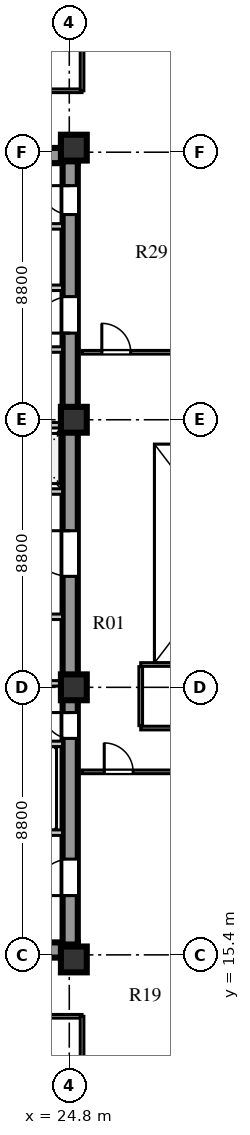
"""IFC4 building model, lengths in metres.
Left out: names, types, materials, properties, quantities, classifications, styles, units other than length and angle.
Written with IfcOpenShell. Run it as: python <this file> out.ifc"""

import sys

from ifc_helpers import new_model, si_unit, direction, frame, frame_2d, origin, origin_2d, place, context, subcontext, project, spatial, rectangle, extrude, element, fill, save


model = new_model("IFC4")
c1 = context("Model", 3, precision=1e-05, world=origin(), true_north=direction((0.0, 1.0)))
c2 = subcontext(c1, "Body", "Model", "MODEL_VIEW")
j1 = project(units=[si_unit("LENGTHUNIT", "METRE"), si_unit("PLANEANGLEUNIT", "RADIAN")], contexts=[c1])
p1 = place(None, origin())
s1 = spatial("IfcSite", under=j1, at=p1, CompositionType="ELEMENT")
p2 = place(p1, origin())
s2 = spatial("IfcBuilding", under=s1, at=p2, CompositionType="ELEMENT")
p3 = place(p2, frame((0.0, 0.0, 173.3)))
s3 = spatial("IfcBuildingStorey", under=s2, at=p3, CompositionType="ELEMENT", Elevation=173.3)
for number, where, z_axis, x_axis in (
    (1, (15.4, 15.56, 0.0), (0.0, 0.0, 1.0), (1.0, 0.0, 0.0)),
    (2, (15.4, 41.69, 0.0), (0.0, 0.0, 1.0), (1.0, 0.0, 0.0)),
):
    element("IfcWall", number, at=place(p3, frame(where, z_axis=z_axis, x_axis=x_axis)), inside=s3, PredefinedType="SHEAR", context=c2, shape_type="SweptSolid", body=[
        extrude(rectangle(XDim=9.68, YDim=0.5, at=frame_2d((4.84, 0.0))), origin(), (0.0, 0.0, 1.0), 3.6),
    ])
p4 = place(p3, frame((24.83, 15.74, 0.0), z_axis=(0.0, 0.0, 1.0), x_axis=(0.0, 1.0, 0.0)))
e3 = element("IfcWall", 3, at=p4, inside=s3, PredefinedType="SHEAR", context=c2, shape_type="SweptSolid", body=[
    extrude(rectangle(XDim=25.76, YDim=0.5, at=frame_2d((12.88, 0.0))), origin(), (0.0, 0.0, 1.0), 3.6),
])
p5 = place(p4, frame((1.61, 0.0, 0.0)))
e4 = element("IfcOpeningElement", 4, at=p5, cuts=e3, PredefinedType="OPENING", context=c2, shape_type="SweptSolid", body=[
    extrude(rectangle(XDim=1.2, YDim=2.1, at=frame_2d((0.6, 1.05))), frame((0.0, 0.26, 0.0), z_axis=(0.0, -1.0, 0.0), x_axis=(1.0, 0.0, 0.0)), (0.0, 0.0, 1.0), 0.52),
])
p6 = place(p4, frame((6.78, 0.0, 0.0)))
e5 = element("IfcOpeningElement", 5, at=p6, cuts=e3, PredefinedType="OPENING", context=c2, shape_type="SweptSolid", body=[
    extrude(rectangle(XDim=0.85, YDim=2.06, at=frame_2d((0.425, 1.03))), frame((0.0, 0.26, 0.0), z_axis=(0.0, -1.0, 0.0), x_axis=(1.0, 0.0, 0.0)), (0.0, 0.0, 1.0), 0.52),
])
p7 = place(p4, frame((12.11, 0.0, 0.0)))
e6 = element("IfcOpeningElement", 6, at=p7, cuts=e3, PredefinedType="OPENING", context=c2, shape_type="SweptSolid", body=[
    extrude(rectangle(XDim=1.5, YDim=2.12, at=frame_2d((0.75, 1.06))), frame((0.0, 0.26, 0.0), z_axis=(0.0, -1.0, 0.0), x_axis=(1.0, 0.0, 0.0)), (0.0, 0.0, 1.0), 0.52),
])
p8 = place(p4, frame((20.11, 0.0, 0.0)))
e7 = element("IfcOpeningElement", 7, at=p8, cuts=e3, PredefinedType="OPENING", context=c2, shape_type="SweptSolid", body=[
    extrude(rectangle(XDim=1.2, YDim=2.12, at=frame_2d((0.6, 1.06))), frame((0.0, 0.26, 0.0), z_axis=(0.0, -1.0, 0.0), x_axis=(1.0, 0.0, 0.0)), (0.0, 0.0, 1.0), 0.52),
])
p9 = place(p4, frame((24.01, 0.0, 0.0)))
e8 = element("IfcOpeningElement", 8, at=p9, cuts=e3, PredefinedType="OPENING", context=c2, shape_type="SweptSolid", body=[
    extrude(rectangle(XDim=0.95, YDim=2.1, at=frame_2d((0.475, 1.05))), frame((0.0, 0.26, 0.0), z_axis=(0.0, -1.0, 0.0), x_axis=(1.0, 0.0, 0.0)), (0.0, 0.0, 1.0), 0.52),
])
for number, where, z_axis, x_axis in (
    (9, (24.95, 15.25, 0.0), (0.0, 0.0, 1.0), (1.0, 0.0, 0.0)),
    (10, (24.95, 24.2, 0.0), (0.0, 0.0, 1.0), (1.0, 0.0, 0.0)),
    (11, (24.95, 33.0, 0.0), (0.0, 0.0, 1.0), (1.0, 0.0, 0.0)),
    (12, (24.95, 41.95, 0.0), (0.0, 0.0, 1.0), (1.0, 0.0, 0.0)),
):
    element("IfcColumn", number, at=place(p3, frame(where, z_axis=z_axis, x_axis=x_axis)), inside=s3, PredefinedType="COLUMN", context=c2, shape_type="SweptSolid", body=[
        extrude(rectangle(XDim=0.85, YDim=0.85, at=origin_2d()), origin(), (0.0, 0.0, 1.0), 3.6),
    ])
p10 = place(p3, frame((19.64, 19.42, 0.0), z_axis=(0.0, 0.0, 1.0), x_axis=(1.0, 0.0, 0.0)))
e13 = element("IfcWall", 13, at=p10, inside=s3, PredefinedType="SOLIDWALL", context=c2, shape_type="SweptSolid", body=[
    extrude(rectangle(XDim=4.94, YDim=0.18, at=frame_2d((2.47, 0.0))), origin(), (0.0, 0.0, 1.0), 3.6),
])
p11 = place(p10, frame((0.72, 0.0, 0.0)))
e14 = element("IfcOpeningElement", 14, at=p11, cuts=e13, PredefinedType="OPENING", context=c2, shape_type="SweptSolid", body=[
    extrude(rectangle(XDim=1.1, YDim=2.1, at=frame_2d((0.55, 1.05))), frame((0.0, 0.1, 0.0), z_axis=(0.0, -1.0, 0.0), x_axis=(1.0, 0.0, 0.0)), (0.0, 0.0, 1.0), 0.2),
])
p12 = place(p10, frame((3.02, 0.0, 0.0)))
e15 = element("IfcOpeningElement", 15, at=p12, cuts=e13, PredefinedType="OPENING", context=c2, shape_type="SweptSolid", body=[
    extrude(rectangle(XDim=1.1, YDim=2.1, at=frame_2d((0.55, 1.05))), frame((0.0, 0.1, 0.0), z_axis=(0.0, -1.0, 0.0), x_axis=(1.0, 0.0, 0.0)), (0.0, 0.0, 1.0), 0.2),
])
p13 = place(p3, frame((19.64, 22.34, 0.0), z_axis=(0.0, 0.0, 1.0), x_axis=(1.0, 0.0, 0.0)))
e16 = element("IfcWall", 16, at=p13, inside=s3, PredefinedType="SOLIDWALL", context=c2, shape_type="SweptSolid", body=[
    extrude(rectangle(XDim=4.94, YDim=0.18, at=frame_2d((2.47, 0.0))), origin(), (0.0, 0.0, 1.0), 3.6),
])
p14 = place(p3, frame((15.9, 26.52, 0.0), z_axis=(0.0, 0.0, 1.0), x_axis=(1.0, 0.0, 0.0)))
e17 = element("IfcWall", 17, at=p14, inside=s3, PredefinedType="SOLIDWALL", context=c2, shape_type="SweptSolid", body=[
    extrude(rectangle(XDim=8.68, YDim=0.18, at=frame_2d((4.34, 0.0))), origin(), (0.0, 0.0, 1.0), 3.6),
])
p15 = place(p14, frame((3.3, 0.0, 0.0)))
e18 = element("IfcOpeningElement", 18, at=p15, cuts=e17, PredefinedType="OPENING", context=c2, shape_type="SweptSolid", body=[
    extrude(rectangle(XDim=0.95, YDim=2.1, at=frame_2d((0.475, 1.05))), frame((0.0, 0.1, 0.0), z_axis=(0.0, -1.0, 0.0), x_axis=(1.0, 0.0, 0.0)), (0.0, 0.0, 1.0), 0.2),
])
p16 = place(p3, frame((15.9, 24.33, 0.0), z_axis=(0.0, 0.0, 1.0), x_axis=(1.0, 0.0, 0.0)))
e19 = element("IfcWall", 19, at=p16, inside=s3, PredefinedType="SOLIDWALL", context=c2, shape_type="SweptSolid", body=[
    extrude(rectangle(XDim=8.68, YDim=0.18, at=frame_2d((4.34, 0.0))), origin(), (0.0, 0.0, 1.0), 2.95),
])
p17 = place(p3, frame((15.9, 30.64, 0.0), z_axis=(0.0, 0.0, 1.0), x_axis=(1.0, 0.0, 0.0)))
e20 = element("IfcWall", 20, at=p17, inside=s3, PredefinedType="SOLIDWALL", context=c2, shape_type="SweptSolid", body=[
    extrude(rectangle(XDim=8.68, YDim=0.18, at=frame_2d((4.34, 0.0))), origin(), (0.0, 0.0, 1.0), 3.6),
])
p18 = place(p17, frame((1.76, 0.0, 0.0)))
e21 = element("IfcOpeningElement", 21, at=p18, cuts=e20, PredefinedType="OPENING", context=c2, shape_type="SweptSolid", body=[
    extrude(rectangle(XDim=1.0, YDim=2.1, at=frame_2d((0.5, 1.05))), frame((0.0, 0.1, 0.0), z_axis=(0.0, -1.0, 0.0), x_axis=(1.0, 0.0, 0.0)), (0.0, 0.0, 1.0), 0.2),
])
p19 = place(p17, frame((3.6, 0.0, 0.0)))
e22 = element("IfcOpeningElement", 22, at=p19, cuts=e20, PredefinedType="OPENING", context=c2, shape_type="SweptSolid", body=[
    extrude(rectangle(XDim=1.0, YDim=2.1, at=frame_2d((0.5, 1.05))), frame((0.0, 0.1, 0.0), z_axis=(0.0, -1.0, 0.0), x_axis=(1.0, 0.0, 0.0)), (0.0, 0.0, 1.0), 0.2),
])
p20 = place(p17, frame((5.44, 0.0, 0.0)))
e23 = element("IfcOpeningElement", 23, at=p20, cuts=e20, PredefinedType="OPENING", context=c2, shape_type="SweptSolid", body=[
    extrude(rectangle(XDim=1.0, YDim=2.1, at=frame_2d((0.5, 1.05))), frame((0.0, 0.1, 0.0), z_axis=(0.0, -1.0, 0.0), x_axis=(1.0, 0.0, 0.0)), (0.0, 0.0, 1.0), 0.2),
])
p21 = place(p17, frame((7.28, 0.0, 0.0)))
e24 = element("IfcOpeningElement", 24, at=p21, cuts=e20, PredefinedType="OPENING", context=c2, shape_type="SweptSolid", body=[
    extrude(rectangle(XDim=1.0, YDim=2.1, at=frame_2d((0.5, 1.05))), frame((0.0, 0.1, 0.0), z_axis=(0.0, -1.0, 0.0), x_axis=(1.0, 0.0, 0.0)), (0.0, 0.0, 1.0), 0.2),
])
p22 = place(p3, frame((15.9, 32.82, 0.0), z_axis=(0.0, 0.0, 1.0), x_axis=(1.0, 0.0, 0.0)))
e25 = element("IfcWall", 25, at=p22, inside=s3, PredefinedType="SOLIDWALL", context=c2, shape_type="SweptSolid", body=[
    extrude(rectangle(XDim=8.68, YDim=0.18, at=frame_2d((4.34, 0.0))), origin(), (0.0, 0.0, 1.0), 2.95),
])
p23 = place(p3, frame((22.02, 35.31, 0.0), z_axis=(0.0, 0.0, 1.0), x_axis=(1.0, 0.0, 0.0)))
e26 = element("IfcWall", 26, at=p23, inside=s3, PredefinedType="SOLIDWALL", context=c2, shape_type="SweptSolid", body=[
    extrude(rectangle(XDim=2.56, YDim=0.18, at=frame_2d((1.28, 0.0))), origin(), (0.0, 0.0, 1.0), 3.6),
])
p24 = place(p23, frame((0.55, 0.0, 0.0)))
e27 = element("IfcOpeningElement", 27, at=p24, cuts=e26, PredefinedType="OPENING", context=c2, shape_type="SweptSolid", body=[
    extrude(rectangle(XDim=1.0, YDim=2.1, at=frame_2d((0.5, 1.05))), frame((0.0, 0.1, 0.0), z_axis=(0.0, -1.0, 0.0), x_axis=(1.0, 0.0, 0.0)), (0.0, 0.0, 1.0), 0.2),
])
p25 = place(p3, frame((19.64, 37.34, 0.0), z_axis=(0.0, 0.0, 1.0), x_axis=(1.0, 0.0, 0.0)))
e28 = element("IfcWall", 28, at=p25, inside=s3, PredefinedType="SOLIDWALL", context=c2, shape_type="SweptSolid", body=[
    extrude(rectangle(XDim=4.94, YDim=0.18, at=frame_2d((2.47, 0.0))), origin(), (0.0, 0.0, 1.0), 3.6),
])
p26 = place(p25, frame((0.45, 0.0, 0.0)))
e29 = element("IfcOpeningElement", 29, at=p26, cuts=e28, PredefinedType="OPENING", context=c2, shape_type="SweptSolid", body=[
    extrude(rectangle(XDim=1.0, YDim=2.1, at=frame_2d((0.5, 1.05))), frame((0.0, 0.1, 0.0), z_axis=(0.0, -1.0, 0.0), x_axis=(1.0, 0.0, 0.0)), (0.0, 0.0, 1.0), 0.2),
])
p27 = place(p25, frame((2.5, 0.0, 0.0)))
e30 = element("IfcOpeningElement", 30, at=p27, cuts=e28, PredefinedType="OPENING", context=c2, shape_type="SweptSolid", body=[
    extrude(rectangle(XDim=1.0, YDim=2.1, at=frame_2d((0.5, 1.05))), frame((0.0, 0.1, 0.0), z_axis=(0.0, -1.0, 0.0), x_axis=(1.0, 0.0, 0.0)), (0.0, 0.0, 1.0), 0.2),
])
p28 = place(p3, frame((19.64, 39.36, 0.0), z_axis=(0.0, 0.0, 1.0), x_axis=(1.0, 0.0, 0.0)))
e31 = element("IfcWall", 31, at=p28, inside=s3, PredefinedType="SOLIDWALL", context=c2, shape_type="SweptSolid", body=[
    extrude(rectangle(XDim=4.94, YDim=0.18, at=frame_2d((2.47, 0.0))), origin(), (0.0, 0.0, 1.0), 3.6),
])
p29 = place(p3, frame((25.22, 21.42, 0.0), z_axis=(0.0, 0.0, 1.0), x_axis=(1.0, 0.0, 0.0)))
e32 = element("IfcWall", 32, at=p29, inside=s3, PredefinedType="PARTITIONING", context=c2, shape_type="SweptSolid", body=[
    extrude(rectangle(XDim=15.6, YDim=0.12, at=frame_2d((7.8, 0.0))), origin(), (0.0, 0.0, 1.0), 3.25),
])
p30 = place(p29, frame((0.73, 0.0, 0.0)))
e33 = element("IfcOpeningElement", 33, at=p30, cuts=e32, PredefinedType="OPENING", context=c2, shape_type="SweptSolid", body=[
    extrude(rectangle(XDim=0.95, YDim=2.1, at=frame_2d((0.475, 1.05))), frame((0.0, 0.07, 0.0), z_axis=(0.0, -1.0, 0.0), x_axis=(1.0, 0.0, 0.0)), (0.0, 0.0, 1.0), 0.14),
])
p31 = place(p29, frame((4.83, 0.0, 0.0)))
e34 = element("IfcOpeningElement", 34, at=p31, cuts=e32, PredefinedType="OPENING", context=c2, shape_type="SweptSolid", body=[
    extrude(rectangle(XDim=0.95, YDim=2.1, at=frame_2d((0.475, 1.05))), frame((0.0, 0.07, 0.0), z_axis=(0.0, -1.0, 0.0), x_axis=(1.0, 0.0, 0.0)), (0.0, 0.0, 1.0), 0.14),
])
p32 = place(p29, frame((10.23, 0.0, 0.0)))
e35 = element("IfcOpeningElement", 35, at=p32, cuts=e32, PredefinedType="OPENING", context=c2, shape_type="SweptSolid", body=[
    extrude(rectangle(XDim=0.95, YDim=2.1, at=frame_2d((0.475, 1.05))), frame((0.0, 0.07, 0.0), z_axis=(0.0, -1.0, 0.0), x_axis=(1.0, 0.0, 0.0)), (0.0, 0.0, 1.0), 0.14),
])
p33 = place(p3, frame((27.15, 22.86, 0.0), z_axis=(0.0, 0.0, 1.0), x_axis=(1.0, 0.0, 0.0)))
e36 = element("IfcWall", 36, at=p33, inside=s3, PredefinedType="PARTITIONING", context=c2, shape_type="SweptSolid", body=[
    extrude(rectangle(XDim=13.67, YDim=0.12, at=frame_2d((6.835, 0.0))), origin(), (0.0, 0.0, 1.0), 3.6),
])
p34 = place(p33, frame((2.2, 0.0, 0.0)))
e37 = element("IfcOpeningElement", 37, at=p34, cuts=e36, PredefinedType="OPENING", context=c2, shape_type="SweptSolid", body=[
    extrude(rectangle(XDim=0.9, YDim=2.08, at=frame_2d((0.45, 1.04))), frame((0.0, 0.07, 0.0), z_axis=(0.0, -1.0, 0.0), x_axis=(1.0, 0.0, 0.0)), (0.0, 0.0, 1.0), 0.14),
])
p35 = place(p3, frame((25.22, 35.22, 0.0), z_axis=(0.0, 0.0, 1.0), x_axis=(1.0, 0.0, 0.0)))
e38 = element("IfcWall", 38, at=p35, inside=s3, PredefinedType="PARTITIONING", context=c2, shape_type="SweptSolid", body=[
    extrude(rectangle(XDim=9.5, YDim=0.12, at=frame_2d((4.75, 0.0))), origin(), (0.0, 0.0, 1.0), 3.6),
])
p36 = place(p35, frame((0.65, 0.0, 0.0)))
e39 = element("IfcOpeningElement", 39, at=p36, cuts=e38, PredefinedType="OPENING", context=c2, shape_type="SweptSolid", body=[
    extrude(rectangle(XDim=0.95, YDim=2.1, at=frame_2d((0.475, 1.05))), frame((0.0, 0.07, 0.0), z_axis=(0.0, -1.0, 0.0), x_axis=(1.0, 0.0, 0.0)), (0.0, 0.0, 1.0), 0.14),
])
p37 = place(p35, frame((5.4, 0.0, 0.0)))
e40 = element("IfcOpeningElement", 40, at=p37, cuts=e38, PredefinedType="OPENING", context=c2, shape_type="SweptSolid", body=[
    extrude(rectangle(XDim=1.05, YDim=2.1, at=frame_2d((0.525, 1.05))), frame((0.0, 0.07, 0.0), z_axis=(0.0, -1.0, 0.0), x_axis=(1.0, 0.0, 0.0)), (0.0, 0.0, 1.0), 0.14),
])
p38 = place(p3, frame((13.39, 13.38, 0.0), z_axis=(0.0, 0.0, 1.0), x_axis=(1.0, 0.0, 0.0)))
e41 = element("IfcWall", 41, at=p38, inside=s3, PredefinedType="PARTITIONING", context=c2, shape_type="SweptSolid", body=[
    extrude(rectangle(XDim=11.83, YDim=0.12, at=frame_2d((5.915, 0.0))), origin(), (0.0, 0.0, 1.0), 3.6),
])
p39 = place(p38, frame((4.76, 0.0, 0.0)))
e42 = element("IfcOpeningElement", 42, at=p39, cuts=e41, PredefinedType="OPENING", context=c2, shape_type="SweptSolid", body=[
    extrude(rectangle(XDim=1.0, YDim=2.08, at=frame_2d((0.5, 1.04))), frame((0.0, 0.07, 0.0), z_axis=(0.0, -1.0, 0.0), x_axis=(1.0, 0.0, 0.0)), (0.0, 0.0, 1.0), 0.14),
])
p40 = place(p3, frame((25.22, 7.88, 0.0), z_axis=(0.0, 0.0, 1.0), x_axis=(0.0, 1.0, 0.0)))
e43 = element("IfcWall", 43, at=p40, inside=s3, PredefinedType="PARTITIONING", context=c2, shape_type="SweptSolid", body=[
    extrude(rectangle(XDim=5.5, YDim=0.12, at=frame_2d((2.75, 0.0))), origin(), (0.0, 0.0, 1.0), 3.15),
])
p41 = place(p3, frame((13.39, 43.82, 0.0), z_axis=(0.0, 0.0, 1.0), x_axis=(1.0, 0.0, 0.0)))
e44 = element("IfcWall", 44, at=p41, inside=s3, PredefinedType="PARTITIONING", context=c2, shape_type="SweptSolid", body=[
    extrude(rectangle(XDim=11.83, YDim=0.12, at=frame_2d((5.915, 0.0))), origin(), (0.0, 0.0, 1.0), 3.6),
])
p42 = place(p41, frame((4.76, 0.0, 0.0)))
e45 = element("IfcOpeningElement", 45, at=p42, cuts=e44, PredefinedType="OPENING", context=c2, shape_type="SweptSolid", body=[
    extrude(rectangle(XDim=1.0, YDim=2.08, at=frame_2d((0.5, 1.04))), frame((0.0, 0.07, 0.0), z_axis=(0.0, -1.0, 0.0), x_axis=(1.0, 0.0, 0.0)), (0.0, 0.0, 1.0), 0.14),
])
p43 = place(p3, frame((25.22, 43.82, 0.0), z_axis=(0.0, 0.0, 1.0), x_axis=(0.0, 1.0, 0.0)))
e46 = element("IfcWall", 46, at=p43, inside=s3, PredefinedType="PARTITIONING", context=c2, shape_type="SweptSolid", body=[
    extrude(rectangle(XDim=5.5, YDim=0.12, at=frame_2d((2.75, 0.0))), origin(), (0.0, 0.0, 1.0), 3.15),
])
p44 = place(p3, frame((27.15, 24.95, 0.0), z_axis=(0.0, 0.0, 1.0), x_axis=(1.0, 0.0, 0.0)))
e47 = element("IfcWall", 47, at=p44, inside=s3, PredefinedType="PARTITIONING", context=c2, shape_type="SweptSolid", body=[
    extrude(rectangle(XDim=9.67, YDim=0.12, at=frame_2d((4.835, 0.0))), origin(), (0.0, 0.0, 1.0), 3.05),
])
p45 = place(p3, frame((27.15, 22.94, 0.0), z_axis=(0.0, 0.0, 1.0), x_axis=(0.0, 1.0, 0.0)))
e48 = element("IfcWall", 48, at=p45, inside=s3, PredefinedType="PARTITIONING", context=c2, shape_type="SweptSolid", body=[
    extrude(rectangle(XDim=1.94, YDim=0.12, at=frame_2d((0.97, 0.0))), origin(), (0.0, 0.0, 1.0), 3.6),
])
p46 = place(p5, frame((1.2, 0.0, 0.0), z_axis=(0.0, 0.0, 1.0), x_axis=(-1.0, 0.0, 0.0)))
e49 = element("IfcDoor", 49, at=p46, inside=s3, OperationType="SINGLE_SWING_RIGHT", PredefinedType="DOOR", context=c2, shape_type="SweptSolid", body=[
    extrude(rectangle(XDim=1.2, YDim=2.1, at=frame_2d((0.6, 1.05))), frame((0.0, 0.025, 0.0), z_axis=(0.0, -1.0, 0.0), x_axis=(1.0, 0.0, 0.0)), (0.0, 0.0, 1.0), 0.05),
])
fill(e4, e49)
p47 = place(p6, frame((0.85, 0.0, 0.0), z_axis=(0.0, 0.0, 1.0), x_axis=(-1.0, 0.0, 0.0)))
e50 = element("IfcDoor", 50, at=p47, inside=s3, OperationType="SINGLE_SWING_LEFT", PredefinedType="DOOR", context=c2, shape_type="SweptSolid", body=[
    extrude(rectangle(XDim=0.85, YDim=2.06, at=frame_2d((0.425, 1.03))), frame((0.0, 0.025, 0.0), z_axis=(0.0, -1.0, 0.0), x_axis=(1.0, 0.0, 0.0)), (0.0, 0.0, 1.0), 0.05),
])
fill(e5, e50)
p48 = place(p7, frame((1.5, 0.0, 0.0), z_axis=(0.0, 0.0, 1.0), x_axis=(-1.0, 0.0, 0.0)))
e51 = element("IfcDoor", 51, at=p48, inside=s3, OperationType="SINGLE_SWING_LEFT", PredefinedType="DOOR", context=c2, shape_type="SweptSolid", body=[
    extrude(rectangle(XDim=1.5, YDim=2.12, at=frame_2d((0.75, 1.06))), frame((0.0, 0.025, 0.0), z_axis=(0.0, -1.0, 0.0), x_axis=(1.0, 0.0, 0.0)), (0.0, 0.0, 1.0), 0.05),
])
fill(e6, e51)
p49 = place(p8, frame((1.2, 0.0, 0.0), z_axis=(0.0, 0.0, 1.0), x_axis=(-1.0, 0.0, 0.0)))
e52 = element("IfcDoor", 52, at=p49, inside=s3, OperationType="SINGLE_SWING_RIGHT", PredefinedType="DOOR", context=c2, shape_type="SweptSolid", body=[
    extrude(rectangle(XDim=1.2, YDim=2.12, at=frame_2d((0.6, 1.06))), frame((0.0, 0.025, 0.0), z_axis=(0.0, -1.0, 0.0), x_axis=(1.0, 0.0, 0.0)), (0.0, 0.0, 1.0), 0.05),
])
fill(e7, e52)
p50 = place(p9, frame((0.95, 0.0, 0.0), z_axis=(0.0, 0.0, 1.0), x_axis=(-1.0, 0.0, 0.0)))
e53 = element("IfcDoor", 53, at=p50, inside=s3, OperationType="SINGLE_SWING_LEFT", PredefinedType="DOOR", context=c2, shape_type="SweptSolid", body=[
    extrude(rectangle(XDim=0.95, YDim=2.1, at=frame_2d((0.475, 1.05))), frame((0.0, 0.025, 0.0), z_axis=(0.0, -1.0, 0.0), x_axis=(1.0, 0.0, 0.0)), (0.0, 0.0, 1.0), 0.05),
])
fill(e8, e53)
p51 = place(p30, frame((0.95, 0.0, 0.0), z_axis=(0.0, 0.0, 1.0), x_axis=(-1.0, 0.0, 0.0)))
e54 = element("IfcDoor", 54, at=p51, inside=s3, OperationType="SINGLE_SWING_RIGHT", PredefinedType="DOOR", context=c2, shape_type="SweptSolid", body=[
    extrude(rectangle(XDim=0.95, YDim=2.1, at=frame_2d((0.475, 1.05))), frame((0.0, 0.025, 0.0), z_axis=(0.0, -1.0, 0.0), x_axis=(1.0, 0.0, 0.0)), (0.0, 0.0, 1.0), 0.05),
])
fill(e33, e54)
p52 = place(p36, origin())
e55 = element("IfcDoor", 55, at=p52, inside=s3, OperationType="SINGLE_SWING_LEFT", PredefinedType="DOOR", context=c2, shape_type="SweptSolid", body=[
    extrude(rectangle(XDim=0.95, YDim=2.1, at=frame_2d((0.475, 1.05))), frame((0.0, 0.025, 0.0), z_axis=(0.0, -1.0, 0.0), x_axis=(1.0, 0.0, 0.0)), (0.0, 0.0, 1.0), 0.05),
])
fill(e39, e55)
save(model, sys.argv[1])
